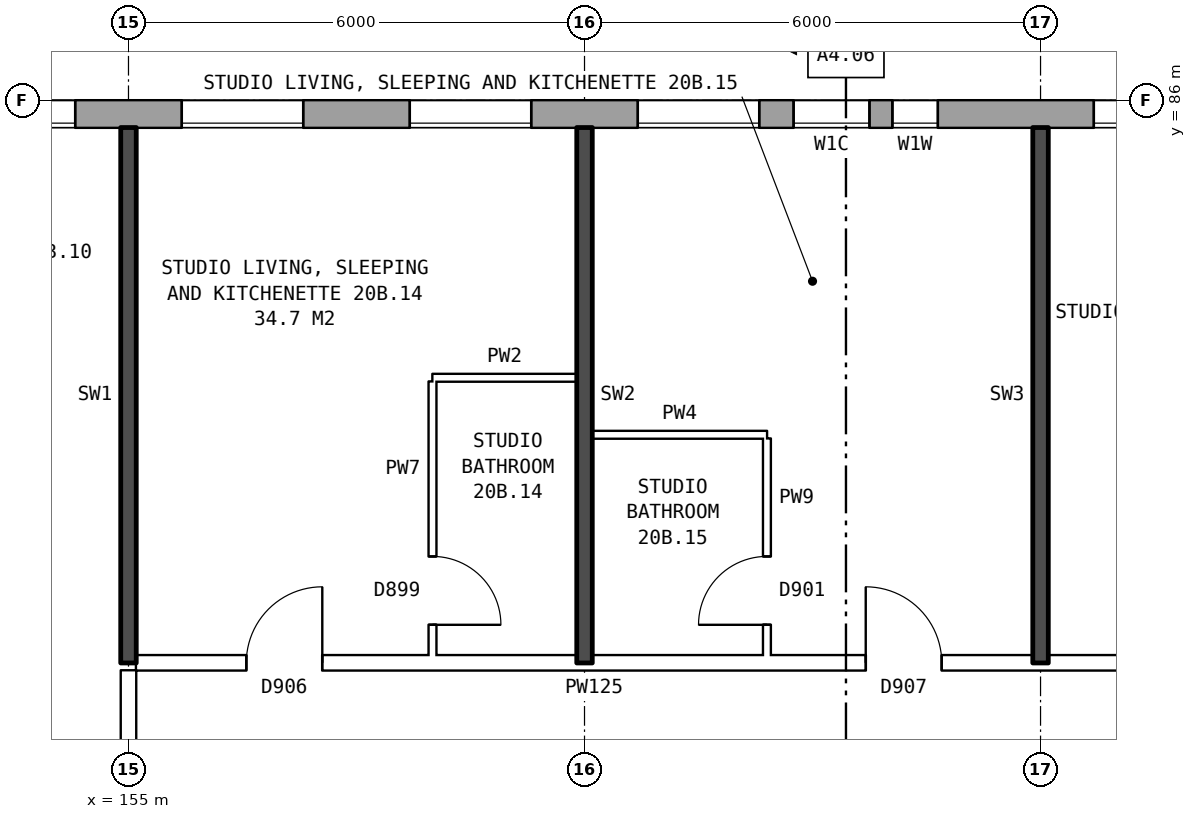
"""IFC4 building model, lengths in metres.
Left out: names, types, materials, properties, quantities, classifications, styles, units other than length and angle.
Written with IfcOpenShell. Run it as: python <this file> out.ifc"""

import sys

from ifc_helpers import new_model, si_unit, direction, frame, frame_2d, origin, place, context, subcontext, project, spatial, rectangle, extrude, element, fill, save


model = new_model("IFC4")
c1 = context("Model", 3, precision=1e-05, world=origin(), true_north=direction((0.0, 1.0)))
c2 = subcontext(c1, "Body", "Model", "MODEL_VIEW")
j1 = project(units=[si_unit("LENGTHUNIT", "METRE"), si_unit("PLANEANGLEUNIT", "RADIAN")], contexts=[c1])
p1 = place(None, origin())
s1 = spatial("IfcSite", under=j1, at=p1, CompositionType="ELEMENT")
p2 = place(p1, origin())
s2 = spatial("IfcBuilding", under=s1, at=p2, CompositionType="ELEMENT")
p3 = place(p2, frame((0.0, 0.0, 74.7)))
s3 = spatial("IfcBuildingStorey", under=s2, at=p3, CompositionType="ELEMENT", Elevation=74.7)
p4 = place(p3, frame((172.175, 85.82, 0.0), z_axis=(0.0, 0.0, 1.0), x_axis=(-1.0, 0.0, 0.0)))
e1 = element("IfcWall", 1, at=p4, inside=s3, PredefinedType="STANDARD", context=c2, shape_type="SweptSolid", body=[
    extrude(rectangle(XDim=38.101, YDim=0.36, at=frame_2d((19.05, 0.0))), origin(), (0.0, 0.0, 1.0), 2.85),
])
p5 = place(p4, frame((2.875, 0.0, 0.8)))
e2 = element("IfcOpeningElement", 2, at=p5, cuts=e1, PredefinedType="OPENING", context=c2, shape_type="SweptSolid", body=[
    extrude(rectangle(XDim=1.6, YDim=1.8, at=frame_2d((0.8, 0.9))), frame((0.0, 0.19, 0.0), z_axis=(0.0, -1.0, 0.0), x_axis=(1.0, 0.0, 0.0)), (0.0, 0.0, 1.0), 0.38),
])
p6 = place(p4, frame((6.525, 0.0, 0.8)))
e3 = element("IfcOpeningElement", 3, at=p6, cuts=e1, PredefinedType="OPENING", context=c2, shape_type="SweptSolid", body=[
    extrude(rectangle(XDim=0.6, YDim=0.9, at=frame_2d((0.3, 0.45))), frame((0.0, 0.19, 0.0), z_axis=(0.0, -1.0, 0.0), x_axis=(1.0, 0.0, 0.0)), (0.0, 0.0, 1.0), 0.38),
])
p7 = place(p4, frame((8.875, 0.0, 0.8)))
e4 = element("IfcOpeningElement", 4, at=p7, cuts=e1, PredefinedType="OPENING", context=c2, shape_type="SweptSolid", body=[
    extrude(rectangle(XDim=1.6, YDim=1.8, at=frame_2d((0.8, 0.9))), frame((0.0, 0.19, 0.0), z_axis=(0.0, -1.0, 0.0), x_axis=(1.0, 0.0, 0.0)), (0.0, 0.0, 1.0), 0.38),
])
p8 = place(p4, frame((11.875, 0.0, 0.8)))
e5 = element("IfcOpeningElement", 5, at=p8, cuts=e1, PredefinedType="OPENING", context=c2, shape_type="SweptSolid", body=[
    extrude(rectangle(XDim=1.6, YDim=1.8, at=frame_2d((0.8, 0.9))), frame((0.0, 0.19, 0.0), z_axis=(0.0, -1.0, 0.0), x_axis=(1.0, 0.0, 0.0)), (0.0, 0.0, 1.0), 0.38),
])
p9 = place(p4, frame((14.875, 0.0, 0.8)))
e6 = element("IfcOpeningElement", 6, at=p9, cuts=e1, PredefinedType="OPENING", context=c2, shape_type="SweptSolid", body=[
    extrude(rectangle(XDim=1.6, YDim=1.8, at=frame_2d((0.8, 0.9))), frame((0.0, 0.19, 0.0), z_axis=(0.0, -1.0, 0.0), x_axis=(1.0, 0.0, 0.0)), (0.0, 0.0, 1.0), 0.38),
])
p10 = place(p4, frame((17.875, 0.0, 0.8)))
e7 = element("IfcOpeningElement", 7, at=p10, cuts=e1, PredefinedType="OPENING", context=c2, shape_type="SweptSolid", body=[
    extrude(rectangle(XDim=1.6, YDim=1.8, at=frame_2d((0.8, 0.9))), frame((0.0, 0.19, 0.0), z_axis=(0.0, -1.0, 0.0), x_axis=(1.0, 0.0, 0.0)), (0.0, 0.0, 1.0), 0.38),
])
p11 = place(p4, frame((20.875, 0.0, 0.8)))
e8 = element("IfcOpeningElement", 8, at=p11, cuts=e1, PredefinedType="OPENING", context=c2, shape_type="SweptSolid", body=[
    extrude(rectangle(XDim=1.6, YDim=1.8, at=frame_2d((0.8, 0.9))), frame((0.0, 0.19, 0.0), z_axis=(0.0, -1.0, 0.0), x_axis=(1.0, 0.0, 0.0)), (0.0, 0.0, 1.0), 0.38),
])
p12 = place(p4, frame((23.875, 0.0, 0.8)))
e9 = element("IfcOpeningElement", 9, at=p12, cuts=e1, PredefinedType="OPENING", context=c2, shape_type="SweptSolid", body=[
    extrude(rectangle(XDim=1.6, YDim=1.8, at=frame_2d((0.8, 0.9))), frame((0.0, 0.19, 0.0), z_axis=(0.0, -1.0, 0.0), x_axis=(1.0, 0.0, 0.0)), (0.0, 0.0, 1.0), 0.38),
])
p13 = place(p4, frame((26.875, 0.0, 0.8)))
e10 = element("IfcOpeningElement", 10, at=p13, cuts=e1, PredefinedType="OPENING", context=c2, shape_type="SweptSolid", body=[
    extrude(rectangle(XDim=1.6, YDim=1.8, at=frame_2d((0.8, 0.9))), frame((0.0, 0.19, 0.0), z_axis=(0.0, -1.0, 0.0), x_axis=(1.0, 0.0, 0.0)), (0.0, 0.0, 1.0), 0.38),
])
p14 = place(p4, frame((29.375, 0.0, 0.8)))
e11 = element("IfcOpeningElement", 11, at=p14, cuts=e1, PredefinedType="OPENING", context=c2, shape_type="SweptSolid", body=[
    extrude(rectangle(XDim=1.2, YDim=1.8, at=frame_2d((0.6, 0.9))), frame((0.0, 0.19, 0.0), z_axis=(0.0, -1.0, 0.0), x_axis=(1.0, 0.0, 0.0)), (0.0, 0.0, 1.0), 0.38),
])
p15 = place(p4, frame((30.875, 0.0, 0.8)))
e12 = element("IfcOpeningElement", 12, at=p15, cuts=e1, PredefinedType="OPENING", context=c2, shape_type="SweptSolid", body=[
    extrude(rectangle(XDim=0.6, YDim=0.9, at=frame_2d((0.3, 0.45))), frame((0.0, 0.19, 0.0), z_axis=(0.0, -1.0, 0.0), x_axis=(1.0, 0.0, 0.0)), (0.0, 0.0, 1.0), 0.38),
])
p16 = place(p4, frame((35.875, 0.0, 0.8)))
e13 = element("IfcOpeningElement", 13, at=p16, cuts=e1, PredefinedType="OPENING", context=c2, shape_type="SweptSolid", body=[
    extrude(rectangle(XDim=1.6, YDim=1.8, at=frame_2d((0.8, 0.9))), frame((0.0, 0.19, 0.0), z_axis=(0.0, -1.0, 0.0), x_axis=(1.0, 0.0, 0.0)), (0.0, 0.0, 1.0), 0.38),
])
p17 = place(p4, frame((7.425, 0.0, 0.8)))
e14 = element("IfcOpeningElement", 14, at=p17, cuts=e1, PredefinedType="OPENING", context=c2, shape_type="SweptSolid", body=[
    extrude(rectangle(XDim=1.0, YDim=1.8, at=frame_2d((0.5, 0.9))), frame((0.0, 0.19, 0.0), z_axis=(0.0, -1.0, 0.0), x_axis=(1.0, 0.0, 0.0)), (0.0, 0.0, 1.0), 0.38),
])
p18 = place(p4, frame((32.725, 0.0, 1.7)))
e15 = element("IfcOpeningElement", 15, at=p18, cuts=e1, PredefinedType="OPENING", context=c2, shape_type="SweptSolid", body=[
    extrude(rectangle(XDim=0.6, YDim=0.9, at=frame_2d((0.3, 0.45))), frame((0.0, 0.19, 0.0), z_axis=(0.0, -1.0, 0.0), x_axis=(1.0, 0.0, 0.0)), (0.0, 0.0, 1.0), 0.38),
])
p19 = place(p4, frame((33.625, 0.0, 0.8)))
e16 = element("IfcOpeningElement", 16, at=p19, cuts=e1, PredefinedType="OPENING", context=c2, shape_type="SweptSolid", body=[
    extrude(rectangle(XDim=1.2, YDim=1.8, at=frame_2d((0.6, 0.9))), frame((0.0, 0.19, 0.0), z_axis=(0.0, -1.0, 0.0), x_axis=(1.0, 0.0, 0.0)), (0.0, 0.0, 1.0), 0.38),
])
p20 = place(p3, frame((155.1, 78.6, 0.0), z_axis=(0.0, 0.0, 1.0), x_axis=(1.0, 0.0, 0.0)))
e17 = element("IfcWall", 17, at=p20, inside=s3, PredefinedType="PARTITIONING", context=c2, shape_type="SweptSolid", body=[
    extrude(rectangle(XDim=19.79, YDim=0.2, at=frame_2d((9.895, 0.0))), origin(), (0.0, 0.0, 1.0), 2.85),
])
p21 = place(p20, frame((1.45, 0.0, 0.0)))
e18 = element("IfcOpeningElement", 18, at=p21, cuts=e17, PredefinedType="OPENING", context=c2, shape_type="SweptSolid", body=[
    extrude(rectangle(XDim=1.0, YDim=2.1, at=frame_2d((0.5, 1.05))), frame((0.0, 0.11, 0.0), z_axis=(0.0, -1.0, 0.0), x_axis=(1.0, 0.0, 0.0)), (0.0, 0.0, 1.0), 0.22),
])
p22 = place(p20, frame((9.6, 0.0, 0.0)))
e19 = element("IfcOpeningElement", 19, at=p22, cuts=e17, PredefinedType="OPENING", context=c2, shape_type="SweptSolid", body=[
    extrude(rectangle(XDim=1.0, YDim=2.1, at=frame_2d((0.5, 1.05))), frame((0.0, 0.11, 0.0), z_axis=(0.0, -1.0, 0.0), x_axis=(1.0, 0.0, 0.0)), (0.0, 0.0, 1.0), 0.22),
])
p23 = place(p20, frame((13.2, 0.0, 0.0)))
e20 = element("IfcOpeningElement", 20, at=p23, cuts=e17, PredefinedType="OPENING", context=c2, shape_type="SweptSolid", body=[
    extrude(rectangle(XDim=1.0, YDim=2.1, at=frame_2d((0.5, 1.05))), frame((0.0, 0.11, 0.0), z_axis=(0.0, -1.0, 0.0), x_axis=(1.0, 0.0, 0.0)), (0.0, 0.0, 1.0), 0.22),
])
p24 = place(p3, frame((161.1, 81.6, 0.0), z_axis=(0.0, 0.0, 1.0), x_axis=(1.0, 0.0, 0.0)))
e21 = element("IfcWall", 21, at=p24, inside=s3, PredefinedType="PARTITIONING", context=c2, shape_type="SweptSolid", body=[
    extrude(rectangle(XDim=2.3, YDim=0.1, at=frame_2d((1.15, 0.0))), origin(), (0.0, 0.0, 1.0), 2.85),
])
p25 = place(p3, frame((159.0, 82.35, 0.0), z_axis=(0.0, 0.0, 1.0), x_axis=(1.0, 0.0, 0.0)))
e22 = element("IfcWall", 22, at=p25, inside=s3, PredefinedType="PARTITIONING", context=c2, shape_type="SweptSolid", body=[
    extrude(rectangle(XDim=1.9, YDim=0.1, at=frame_2d((0.95, 0.0))), origin(), (0.0, 0.0, 1.0), 2.85),
])
p26 = place(p3, frame((155.0, 76.3, 0.0), z_axis=(0.0, 0.0, 1.0), x_axis=(0.0, 1.0, 0.0)))
e23 = element("IfcWall", 23, at=p26, inside=s3, PredefinedType="PARTITIONING", context=c2, shape_type="SweptSolid", body=[
    extrude(rectangle(XDim=2.2, YDim=0.2, at=frame_2d((1.1, 0.0))), origin(), (0.0, 0.0, 1.0), 2.85),
])
p27 = place(p3, frame((155.0, 78.6, 0.0), z_axis=(0.0, 0.0, 1.0), x_axis=(0.0, 1.0, 0.0)))
e24 = element("IfcWall", 24, at=p27, inside=s3, PredefinedType="SOLIDWALL", context=c2, shape_type="SweptSolid", body=[
    extrude(rectangle(XDim=7.04, YDim=0.2, at=frame_2d((3.52, 0.0))), origin(), (0.0, 0.0, 1.0), 2.85),
])
p28 = place(p3, frame((159.0, 78.7, 0.0), z_axis=(0.0, 0.0, 1.0), x_axis=(0.0, 1.0, 0.0)))
e25 = element("IfcWall", 25, at=p28, inside=s3, PredefinedType="PARTITIONING", context=c2, shape_type="SweptSolid", body=[
    extrude(rectangle(XDim=3.6, YDim=0.1, at=frame_2d((1.8, 0.0))), origin(), (0.0, 0.0, 1.0), 2.85),
])
p29 = place(p28, frame((0.4, 0.0, 0.0)))
e26 = element("IfcOpeningElement", 26, at=p29, cuts=e25, PredefinedType="OPENING", context=c2, shape_type="SweptSolid", body=[
    extrude(rectangle(XDim=0.9, YDim=2.1, at=frame_2d((0.45, 1.05))), frame((0.0, 0.06, 0.0), z_axis=(0.0, -1.0, 0.0), x_axis=(1.0, 0.0, 0.0)), (0.0, 0.0, 1.0), 0.12),
])
p30 = place(p3, frame((161.0, 78.6, 0.0), z_axis=(0.0, 0.0, 1.0), x_axis=(0.0, 1.0, 0.0)))
e27 = element("IfcWall", 27, at=p30, inside=s3, PredefinedType="SOLIDWALL", context=c2, shape_type="SweptSolid", body=[
    extrude(rectangle(XDim=7.04, YDim=0.2, at=frame_2d((3.52, 0.0))), origin(), (0.0, 0.0, 1.0), 2.85),
])
p31 = place(p3, frame((163.4, 78.7, 0.0), z_axis=(0.0, 0.0, 1.0), x_axis=(0.0, 1.0, 0.0)))
e28 = element("IfcWall", 28, at=p31, inside=s3, PredefinedType="PARTITIONING", context=c2, shape_type="SweptSolid", body=[
    extrude(rectangle(XDim=2.85, YDim=0.1, at=frame_2d((1.425, 0.0))), origin(), (0.0, 0.0, 1.0), 2.85),
])
p32 = place(p31, frame((0.4, 0.0, 0.0)))
e29 = element("IfcOpeningElement", 29, at=p32, cuts=e28, PredefinedType="OPENING", context=c2, shape_type="SweptSolid", body=[
    extrude(rectangle(XDim=0.9, YDim=2.1, at=frame_2d((0.45, 1.05))), frame((0.0, 0.06, 0.0), z_axis=(0.0, -1.0, 0.0), x_axis=(1.0, 0.0, 0.0)), (0.0, 0.0, 1.0), 0.12),
])
p33 = place(p3, frame((167.0, 78.6, 0.0), z_axis=(0.0, 0.0, 1.0), x_axis=(0.0, 1.0, 0.0)))
e30 = element("IfcWall", 30, at=p33, inside=s3, PredefinedType="SOLIDWALL", context=c2, shape_type="SweptSolid", body=[
    extrude(rectangle(XDim=7.04, YDim=0.2, at=frame_2d((3.52, 0.0))), origin(), (0.0, 0.0, 1.0), 2.85),
])
p34 = place(p5, origin())
e31 = element("IfcWindow", 31, at=p34, inside=s3, PartitioningType="SINGLE_PANEL", PredefinedType="WINDOW", context=c2, shape_type="SweptSolid", body=[
    extrude(rectangle(XDim=1.6, YDim=1.8, at=frame_2d((0.8, 0.9))), frame((0.0, 0.15, 0.0), z_axis=(0.0, -1.0, 0.0), x_axis=(1.0, 0.0, 0.0)), (0.0, 0.0, 1.0), 0.06),
])
fill(e2, e31)
p35 = place(p6, origin())
e32 = element("IfcWindow", 32, at=p35, inside=s3, PartitioningType="SINGLE_PANEL", PredefinedType="WINDOW", context=c2, shape_type="SweptSolid", body=[
    extrude(rectangle(XDim=0.6, YDim=0.9, at=frame_2d((0.3, 0.45))), frame((0.0, 0.15, 0.0), z_axis=(0.0, -1.0, 0.0), x_axis=(1.0, 0.0, 0.0)), (0.0, 0.0, 1.0), 0.06),
])
fill(e3, e32)
p36 = place(p7, origin())
e33 = element("IfcWindow", 33, at=p36, inside=s3, PartitioningType="SINGLE_PANEL", PredefinedType="WINDOW", context=c2, shape_type="SweptSolid", body=[
    extrude(rectangle(XDim=1.6, YDim=1.8, at=frame_2d((0.8, 0.9))), frame((0.0, 0.15, 0.0), z_axis=(0.0, -1.0, 0.0), x_axis=(1.0, 0.0, 0.0)), (0.0, 0.0, 1.0), 0.06),
])
fill(e4, e33)
p37 = place(p8, origin())
e34 = element("IfcWindow", 34, at=p37, inside=s3, PartitioningType="SINGLE_PANEL", PredefinedType="WINDOW", context=c2, shape_type="SweptSolid", body=[
    extrude(rectangle(XDim=1.6, YDim=1.8, at=frame_2d((0.8, 0.9))), frame((0.0, 0.15, 0.0), z_axis=(0.0, -1.0, 0.0), x_axis=(1.0, 0.0, 0.0)), (0.0, 0.0, 1.0), 0.06),
])
fill(e5, e34)
p38 = place(p9, origin())
e35 = element("IfcWindow", 35, at=p38, inside=s3, PartitioningType="SINGLE_PANEL", PredefinedType="WINDOW", context=c2, shape_type="SweptSolid", body=[
    extrude(rectangle(XDim=1.6, YDim=1.8, at=frame_2d((0.8, 0.9))), frame((0.0, 0.15, 0.0), z_axis=(0.0, -1.0, 0.0), x_axis=(1.0, 0.0, 0.0)), (0.0, 0.0, 1.0), 0.06),
])
fill(e6, e35)
p39 = place(p10, origin())
e36 = element("IfcWindow", 36, at=p39, inside=s3, PartitioningType="SINGLE_PANEL", PredefinedType="WINDOW", context=c2, shape_type="SweptSolid", body=[
    extrude(rectangle(XDim=1.6, YDim=1.8, at=frame_2d((0.8, 0.9))), frame((0.0, 0.15, 0.0), z_axis=(0.0, -1.0, 0.0), x_axis=(1.0, 0.0, 0.0)), (0.0, 0.0, 1.0), 0.06),
])
fill(e7, e36)
p40 = place(p21, origin())
e37 = element("IfcDoor", 37, at=p40, inside=s3, OperationType="SINGLE_SWING_RIGHT", PredefinedType="DOOR", context=c2, shape_type="SweptSolid", body=[
    extrude(rectangle(XDim=1.0, YDim=2.1, at=frame_2d((0.5, 1.05))), frame((0.0, 0.025, 0.0), z_axis=(0.0, -1.0, 0.0), x_axis=(1.0, 0.0, 0.0)), (0.0, 0.0, 1.0), 0.05),
])
fill(e18, e37)
p41 = place(p29, frame((0.9, 0.0, 0.0), z_axis=(0.0, 0.0, 1.0), x_axis=(-1.0, 0.0, 0.0)))
e38 = element("IfcDoor", 38, at=p41, inside=s3, OperationType="SINGLE_SWING_RIGHT", PredefinedType="DOOR", context=c2, shape_type="SweptSolid", body=[
    extrude(rectangle(XDim=0.9, YDim=2.1, at=frame_2d((0.45, 1.05))), frame((0.0, 0.025, 0.0), z_axis=(0.0, -1.0, 0.0), x_axis=(1.0, 0.0, 0.0)), (0.0, 0.0, 1.0), 0.05),
])
fill(e26, e38)
p42 = place(p22, origin())
e39 = element("IfcDoor", 39, at=p42, inside=s3, OperationType="SINGLE_SWING_LEFT", PredefinedType="DOOR", context=c2, shape_type="SweptSolid", body=[
    extrude(rectangle(XDim=1.0, YDim=2.1, at=frame_2d((0.5, 1.05))), frame((0.0, 0.025, 0.0), z_axis=(0.0, -1.0, 0.0), x_axis=(1.0, 0.0, 0.0)), (0.0, 0.0, 1.0), 0.05),
])
fill(e19, e39)
p43 = place(p32, origin())
e40 = element("IfcDoor", 40, at=p43, inside=s3, OperationType="SINGLE_SWING_LEFT", PredefinedType="DOOR", context=c2, shape_type="SweptSolid", body=[
    extrude(rectangle(XDim=0.9, YDim=2.1, at=frame_2d((0.45, 1.05))), frame((0.0, 0.025, 0.0), z_axis=(0.0, -1.0, 0.0), x_axis=(1.0, 0.0, 0.0)), (0.0, 0.0, 1.0), 0.05),
])
fill(e29, e40)
p44 = place(p17, origin())
e41 = element("IfcWindow", 41, at=p44, inside=s3, PartitioningType="SINGLE_PANEL", PredefinedType="WINDOW", context=c2, shape_type="SweptSolid", body=[
    extrude(rectangle(XDim=1.0, YDim=1.8, at=frame_2d((0.5, 0.9))), frame((0.0, 0.15, 0.0), z_axis=(0.0, -1.0, 0.0), x_axis=(1.0, 0.0, 0.0)), (0.0, 0.0, 1.0), 0.06),
])
fill(e14, e41)
save(model, sys.argv[1])
